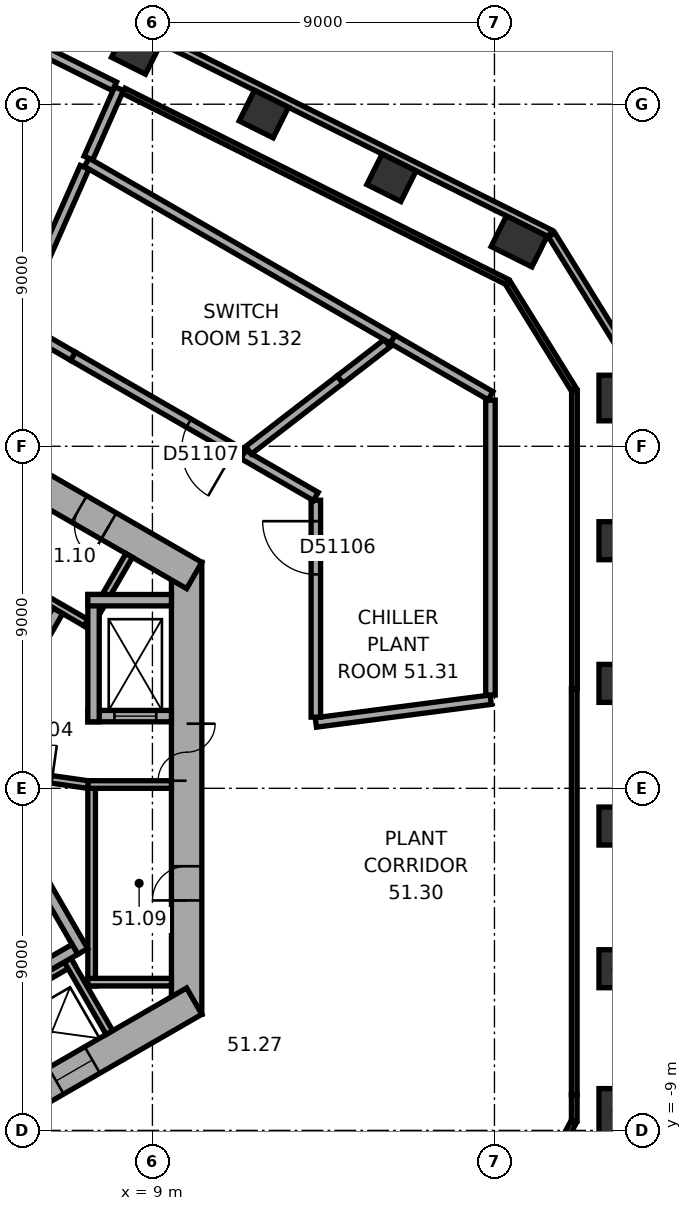
"""IFC4 building model, lengths in metres.
Left out: names, types, materials, properties, quantities, classifications, styles, units other than length and angle.
Written with IfcOpenShell. Run it as: python <this file> out.ifc"""

import sys

from ifc_helpers import new_model, si_unit, direction, frame, frame_2d, origin, origin_2d, place, context, subcontext, project, spatial, rectangle, extrude, element, fill, save


model = new_model("IFC4")
c1 = context("Model", 3, precision=1e-05, world=origin(), true_north=direction((0.0, 1.0)))
c2 = subcontext(c1, "Body", "Model", "MODEL_VIEW")
j1 = project(units=[si_unit("LENGTHUNIT", "METRE"), si_unit("PLANEANGLEUNIT", "RADIAN")], contexts=[c1])
p1 = place(None, origin())
s1 = spatial("IfcSite", under=j1, at=p1, CompositionType="ELEMENT")
p2 = place(p1, origin())
s2 = spatial("IfcBuilding", under=s1, at=p2, CompositionType="ELEMENT")
p3 = place(p2, frame((0.0, 0.0, 205.8)))
s3 = spatial("IfcBuildingStorey", under=s2, at=p3, CompositionType="ELEMENT", Elevation=205.8)
p4 = place(p3, frame((21.2, -8.501, 0.0), z_axis=(0.0, 0.0, 1.0), x_axis=(0.0, 1.0, 0.0)))
e1 = element("IfcColumn", 1, at=p4, inside=s3, PredefinedType="COLUMN", context=c2, shape_type="SweptSolid", body=[
    extrude(rectangle(XDim=1.2, YDim=0.9, at=origin_2d()), origin(), (0.0, 0.0, 1.0), 4.8),
])
for number, where, z_axis, x_axis in (
    (2, (21.2, -4.747, 0.0), (0.0, 0.0, 1.0), (0.0, 1.0, 0.0)),
    (3, (21.2, -0.993, 0.0), (0.0, 0.0, 1.0), (0.0, 1.0, 0.0)),
    (4, (21.2, 2.761, 0.0), (0.0, 0.0, 1.0), (0.0, 1.0, 0.0)),
    (5, (21.2, 6.515, 0.0), (0.0, 0.0, 1.0), (0.0, 1.0, 0.0)),
):
    element("IfcColumn", number, at=place(p3, frame(where, z_axis=z_axis, x_axis=x_axis)), inside=s3, PredefinedType="COLUMN", context=c2, shape_type="SweptSolid", body=[
        extrude(rectangle(XDim=1.0, YDim=0.9, at=origin_2d()), origin(), (0.0, 0.0, 1.0), 4.8),
    ])
for number, where, z_axis, x_axis in (
    (6, (21.2, 10.27, 0.0), (0.0, 0.0, 1.0), (0.0, 1.0, 0.0)),
    (7, (18.65, 14.39, 0.0), (0.0, 0.0, 1.0), (-0.895, 0.446, 0.0)),
):
    element("IfcColumn", number, at=place(p3, frame(where, z_axis=z_axis, x_axis=x_axis)), inside=s3, PredefinedType="COLUMN", context=c2, shape_type="SweptSolid", body=[
        extrude(rectangle(XDim=1.2, YDim=0.9, at=origin_2d()), origin(), (0.0, 0.0, 1.0), 4.8),
    ])
for number, where, z_axis, x_axis in (
    (8, (15.29, 16.065, 0.0), (0.0, 0.0, 1.0), (-0.895, 0.446, 0.0)),
    (9, (11.931, 17.74, 0.0), (0.0, 0.0, 1.0), (-0.895, 0.446, 0.0)),
    (10, (8.571, 19.416, 0.0), (0.0, 0.0, 1.0), (-0.895, 0.446, 0.0)),
):
    element("IfcColumn", number, at=place(p3, frame(where, z_axis=z_axis, x_axis=x_axis)), inside=s3, PredefinedType="COLUMN", context=c2, shape_type="SweptSolid", body=[
        extrude(rectangle(XDim=1.0, YDim=0.9, at=origin_2d()), origin(), (0.0, 0.0, 1.0), 4.8),
    ])
p5 = place(p3, frame((9.9, -5.947, 0.0), z_axis=(0.0, 0.0, 1.0), x_axis=(0.0, 1.0, 0.0)))
e11 = element("IfcWall", 11, at=p5, inside=s3, PredefinedType="SHEAR", context=c2, shape_type="SweptSolid", body=[
    extrude(rectangle(XDim=11.894, YDim=0.8, at=frame_2d((5.947, 0.0))), origin(), (0.0, 0.0, 1.0), 4.8),
])
p6 = place(p5, frame((6.147, 0.0, 0.0)))
e12 = element("IfcOpeningElement", 12, at=p6, cuts=e11, PredefinedType="OPENING", context=c2, shape_type="SweptSolid", body=[
    extrude(rectangle(XDim=1.5, YDim=2.1, at=frame_2d((0.75, 1.05))), frame((0.0, 0.41, 0.0), z_axis=(0.0, -1.0, 0.0), x_axis=(1.0, 0.0, 0.0)), (0.0, 0.0, 1.0), 0.82),
])
p7 = place(p5, frame((2.997, 0.0, 0.0)))
e13 = element("IfcOpeningElement", 13, at=p7, cuts=e11, PredefinedType="OPENING", context=c2, shape_type="SweptSolid", body=[
    extrude(rectangle(XDim=0.9, YDim=2.1, at=frame_2d((0.45, 1.05))), frame((0.0, 0.41, 0.0), z_axis=(0.0, -1.0, 0.0), x_axis=(1.0, 0.0, 0.0)), (0.0, 0.0, 1.0), 0.82),
])
p8 = place(p3, frame((10.1, 5.6, 0.0), z_axis=(0.0, 0.0, 1.0), x_axis=(-0.866023897231, 0.500002609418, 0.0)))
e14 = element("IfcWall", 14, at=p8, inside=s3, PredefinedType="SHEAR", context=c2, shape_type="SweptSolid", body=[
    extrude(rectangle(XDim=11.894, YDim=0.8, at=frame_2d((5.947, 0.0))), origin(), (0.0, 0.0, 1.0), 4.8),
])
p9 = place(p8, frame((2.597, 0.0, 0.0)))
e15 = element("IfcOpeningElement", 15, at=p9, cuts=e14, PredefinedType="OPENING", context=c2, shape_type="SweptSolid", body=[
    extrude(rectangle(XDim=0.9, YDim=2.1, at=frame_2d((0.45, 1.05))), frame((0.0, 0.41, 0.0), z_axis=(0.0, -1.0, 0.0), x_axis=(1.0, 0.0, 0.0)), (0.0, 0.0, 1.0), 0.82),
])
p10 = place(p8, frame((6.497, 0.0, 0.0)))
e16 = element("IfcOpeningElement", 16, at=p10, cuts=e14, PredefinedType="OPENING", context=c2, shape_type="SweptSolid", body=[
    extrude(rectangle(XDim=0.9, YDim=2.1, at=frame_2d((0.45, 1.05))), frame((0.0, 0.41, 0.0), z_axis=(0.0, -1.0, 0.0), x_axis=(1.0, 0.0, 0.0)), (0.0, 0.0, 1.0), 0.82),
])
p11 = place(p3, frame((-0.2, -11.547, 0.0), z_axis=(0.0, 0.0, 1.0), x_axis=(0.866023897231, 0.500002609418, 0.0)))
e17 = element("IfcWall", 17, at=p11, inside=s3, PredefinedType="SHEAR", context=c2, shape_type="SweptSolid", body=[
    extrude(rectangle(XDim=11.894, YDim=0.8, at=frame_2d((5.947, 0.0))), origin(), (0.0, 0.0, 1.0), 4.8),
])
p12 = place(p11, frame((2.497, 0.0, 0.0)))
e18 = element("IfcOpeningElement", 18, at=p12, cuts=e17, PredefinedType="OPENING", context=c2, shape_type="SweptSolid", body=[
    extrude(rectangle(XDim=1.1, YDim=2.1, at=frame_2d((0.55, 1.05))), frame((0.0, 0.41, 0.0), z_axis=(0.0, -1.0, 0.0), x_axis=(1.0, 0.0, 0.0)), (0.0, 0.0, 1.0), 0.82),
])
p13 = place(p11, frame((5.097, 0.0, 0.0)))
e19 = element("IfcOpeningElement", 19, at=p13, cuts=e17, PredefinedType="OPENING", context=c2, shape_type="SweptSolid", body=[
    extrude(rectangle(XDim=1.1, YDim=2.1, at=frame_2d((0.55, 1.05))), frame((0.0, 0.41, 0.0), z_axis=(0.0, -1.0, 0.0), x_axis=(1.0, 0.0, 0.0)), (0.0, 0.0, 1.0), 0.82),
])
p14 = place(p11, frame((7.697, 0.0, 0.0)))
e20 = element("IfcOpeningElement", 20, at=p14, cuts=e17, PredefinedType="OPENING", context=c2, shape_type="SweptSolid", body=[
    extrude(rectangle(XDim=1.1, YDim=2.1, at=frame_2d((0.55, 1.05))), frame((0.0, 0.41, 0.0), z_axis=(0.0, -1.0, 0.0), x_axis=(1.0, 0.0, 0.0)), (0.0, 0.0, 1.0), 0.82),
])
p15 = place(p3, frame((21.735, 10.958, 0.0), z_axis=(0.0, 0.0, 1.0), x_axis=(-0.526213807775, 0.850352296702, 0.0)))
e21 = element("IfcWall", 21, at=p15, inside=s3, PredefinedType="STANDARD", context=c2, shape_type="SweptSolid", body=[
    extrude(rectangle(XDim=4.238, YDim=0.2, at=frame_2d((2.119, 0.0))), origin(), (0.0, 0.0, 1.0), 4.8),
])
p16 = place(p3, frame((19.464, 14.599, 0.0), z_axis=(0.0, 0.0, 1.0), x_axis=(-0.894935755043, 0.446195018289, 0.0)))
e22 = element("IfcWall", 22, at=p16, inside=s3, PredefinedType="STANDARD", context=c2, shape_type="SweptSolid", body=[
    extrude(rectangle(XDim=20.044, YDim=0.2, at=frame_2d((10.022, 0.0))), origin(), (0.0, 0.0, 1.0), 4.8),
])
p17 = place(p3, frame((7.4, -5.2, 0.0), z_axis=(0.0, 0.0, 1.0), x_axis=(0.0, 1.0, 0.0)))
e23 = element("IfcWall", 23, at=p17, inside=s3, PredefinedType="PARTITIONING", context=c2, shape_type="SweptSolid", body=[
    extrude(rectangle(XDim=5.4, YDim=0.2, at=frame_2d((2.7, 0.0))), origin(), (0.0, 0.0, 1.0), 4.52),
])
for number, where, z_axis, x_axis in (
    (24, (7.3, -5.1, 0.0), (0.0, 0.0, 1.0), (1.0, 0.0, 0.0)),
    (25, (7.3, 0.1, 0.0), (0.0, 0.0, 1.0), (1.0, 0.0, 0.0)),
):
    element("IfcWall", number, at=place(p3, frame(where, z_axis=z_axis, x_axis=x_axis)), inside=s3, PredefinedType="PARTITIONING", context=c2, shape_type="SweptSolid", body=[
        extrude(rectangle(XDim=2.2, YDim=0.2, at=frame_2d((1.1, 0.0))), origin(), (0.0, 0.0, 1.0), 4.52),
    ])
p18 = place(p3, frame((7.424, 4.259, 0.0), z_axis=(0.0, 0.0, 1.0), x_axis=(-0.866026010844, 0.49999894854, 0.0)))
e26 = element("IfcWall", 26, at=p18, inside=s3, PredefinedType="PARTITIONING", context=c2, shape_type="SweptSolid", body=[
    extrude(rectangle(XDim=8.0, YDim=0.2, at=frame_2d((4.0, 0.0))), origin(), (0.0, 0.0, 1.0), 4.52),
])
p19 = place(p3, frame((7.287, 4.222, 0.0), z_axis=(0.0, 0.0, 1.0), x_axis=(0.499946605688, 0.86605622881, 0.0)))
e27 = element("IfcWall", 27, at=p19, inside=s3, PredefinedType="PARTITIONING", context=c2, shape_type="SweptSolid", body=[
    extrude(rectangle(XDim=2.2, YDim=0.2, at=frame_2d((1.1, 0.0))), origin(), (0.0, 0.0, 1.0), 4.52),
])
p20 = place(p3, frame((-0.024, -8.559, 0.0), z_axis=(0.0, 0.0, 1.0), x_axis=(0.866026010844, 0.49999894854, 0.0)))
e28 = element("IfcWall", 28, at=p20, inside=s3, PredefinedType="PARTITIONING", context=c2, shape_type="SweptSolid", body=[
    extrude(rectangle(XDim=8.0, YDim=0.2, at=frame_2d((4.0, 0.0))), origin(), (0.0, 0.0, 1.0), 4.52),
])
p21 = place(p3, frame((6.768, -4.522, 0.0), z_axis=(0.0, 0.0, 1.0), x_axis=(0.50002983664, -0.866008176907, 0.0)))
e29 = element("IfcWall", 29, at=p21, inside=s3, PredefinedType="PARTITIONING", context=c2, shape_type="SweptSolid", body=[
    extrude(rectangle(XDim=2.2, YDim=0.2, at=frame_2d((1.1, 0.0))), origin(), (0.0, 0.0, 1.0), 4.52),
])
p22 = place(p3, frame((4.158, 0.602, 0.0), z_axis=(0.0, 0.0, 1.0), x_axis=(0.499977259774, 0.866038532462, 0.0)))
e30 = element("IfcWall", 30, at=p22, inside=s3, PredefinedType="SHEAR", context=c2, shape_type="SweptSolid", body=[
    extrude(rectangle(XDim=4.7, YDim=0.3, at=frame_2d((2.35, 0.0))), origin(), (0.0, 0.0, 1.0), 4.52),
])
p23 = place(p22, frame((0.8, 0.0, 0.0)))
e31 = element("IfcOpeningElement", 31, at=p23, cuts=e30, PredefinedType="OPENING", context=c2, shape_type="SweptSolid", body=[
    extrude(rectangle(XDim=1.2, YDim=2.1, at=frame_2d((0.6, 1.05))), frame((0.0, 0.16, 0.0), z_axis=(0.0, -1.0, 0.0), x_axis=(1.0, 0.0, 0.0)), (0.0, 0.0, 1.0), 0.32),
])
p24 = place(p3, frame((6.303, 4.617, 0.0), z_axis=(0.0, 0.0, 1.0), x_axis=(-0.866027801685, 0.499995846692, 0.0)))
e32 = element("IfcWall", 32, at=p24, inside=s3, PredefinedType="SHEAR", context=c2, shape_type="SweptSolid", body=[
    extrude(rectangle(XDim=7.06, YDim=0.3, at=frame_2d((3.53, 0.0))), origin(), (0.0, 0.0, 1.0), 4.52),
])
p25 = place(p3, frame((4.816, -0.222, 0.0), z_axis=(0.0, 0.0, 1.0), x_axis=(0.499977259774, -0.866038532462, 0.0)))
e33 = element("IfcWall", 33, at=p25, inside=s3, PredefinedType="SHEAR", context=c2, shape_type="SweptSolid", body=[
    extrude(rectangle(XDim=4.7, YDim=0.3, at=frame_2d((2.35, 0.0))), origin(), (0.0, 0.0, 1.0), 4.52),
])
p26 = place(p3, frame((0.847, -7.767, 0.0), z_axis=(0.0, 0.0, 1.0), x_axis=(0.866027801685, 0.499995846692, 0.0)))
e34 = element("IfcWall", 34, at=p26, inside=s3, PredefinedType="SHEAR", context=c2, shape_type="SweptSolid", body=[
    extrude(rectangle(XDim=7.06, YDim=0.3, at=frame_2d((3.53, 0.0))), origin(), (0.0, 0.0, 1.0), 4.52),
])
p27 = place(p3, frame((7.3, 1.9, 0.0), z_axis=(0.0, 0.0, 1.0), x_axis=(1.0, 0.0, 0.0)))
e35 = element("IfcWall", 35, at=p27, inside=s3, PredefinedType="SHEAR", context=c2, shape_type="SweptSolid", body=[
    extrude(rectangle(XDim=2.2, YDim=0.3, at=frame_2d((1.1, 0.0))), origin(), (0.0, 0.0, 1.0), 4.52),
])
p28 = place(p27, frame((0.7, 0.0, 0.0)))
e36 = element("IfcOpeningElement", 36, at=p28, cuts=e35, PredefinedType="OPENING", context=c2, shape_type="SweptSolid", body=[
    extrude(rectangle(XDim=1.1, YDim=2.1, at=frame_2d((0.55, 1.05))), frame((0.0, 0.16, 0.0), z_axis=(0.0, -1.0, 0.0), x_axis=(1.0, 0.0, 0.0)), (0.0, 0.0, 1.0), 0.32),
])
p29 = place(p3, frame((7.45, 1.75, 0.0), z_axis=(0.0, 0.0, 1.0), x_axis=(0.0, 1.0, 0.0)))
e37 = element("IfcWall", 37, at=p29, inside=s3, PredefinedType="SHEAR", context=c2, shape_type="SweptSolid", body=[
    extrude(rectangle(XDim=3.35, YDim=0.3, at=frame_2d((1.675, 0.0))), origin(), (0.0, 0.0, 1.0), 4.52),
])
p30 = place(p3, frame((7.3, 4.95, 0.0), z_axis=(0.0, 0.0, 1.0), x_axis=(1.0, 0.0, 0.0)))
e38 = element("IfcWall", 38, at=p30, inside=s3, PredefinedType="SHEAR", context=c2, shape_type="SweptSolid", body=[
    extrude(rectangle(XDim=2.2, YDim=0.3, at=frame_2d((1.1, 0.0))), origin(), (0.0, 0.0, 1.0), 4.52),
])
p31 = place(p3, frame((4.327, 0.521, 0.0), z_axis=(0.0, 0.0, 1.0), x_axis=(0.990124376366, -0.14019172346, 0.0)))
e39 = element("IfcWall", 39, at=p31, inside=s3, PredefinedType="PARTITIONING", context=c2, shape_type="SweptSolid", body=[
    extrude(rectangle(XDim=3.002, YDim=0.2, at=frame_2d((1.501, 0.0))), origin(), (0.0, 0.0, 1.0), 4.52),
])
p32 = place(p31, frame((1.15, 0.0, 0.0)))
e40 = element("IfcOpeningElement", 40, at=p32, cuts=e39, PredefinedType="OPENING", context=c2, shape_type="SweptSolid", body=[
    extrude(rectangle(XDim=0.9, YDim=2.1, at=frame_2d((0.45, 1.05))), frame((0.0, 0.11, 0.0), z_axis=(0.0, -1.0, 0.0), x_axis=(1.0, 0.0, 0.0)), (0.0, 0.0, 1.0), 0.22),
])
p33 = place(p3, frame((20.081, -8.784, 0.0), z_axis=(0.0, 0.0, 1.0), x_axis=(-0.473349998863, -0.880874439734, 0.0)))
e41 = element("IfcWall", 41, at=p33, inside=s3, PredefinedType="PARTITIONING", context=c2, shape_type="SweptSolid", body=[
    extrude(rectangle(XDim=3.535, YDim=0.15, at=frame_2d((1.767, 0.0))), origin(), (0.0, 0.0, 1.0), 4.52),
])
p34 = place(p3, frame((20.1, -8.06, 0.0), z_axis=(0.0, 0.0, 1.0), x_axis=(0.0, -1.0, 0.0)))
e42 = element("IfcWall", 42, at=p34, inside=s3, PredefinedType="PARTITIONING", context=c2, shape_type="SweptSolid", body=[
    extrude(rectangle(XDim=0.688, YDim=0.15, at=frame_2d((0.344, 0.0))), origin(), (0.0, 0.0, 1.0), 4.52),
])
p35 = place(p3, frame((13.3, 1.732, 0.0), z_axis=(0.0, 0.0, 1.0), x_axis=(0.991624166516, 0.129156929283, 0.0)))
e43 = element("IfcWall", 43, at=p35, inside=s3, PredefinedType="SOLIDWALL", context=c2, shape_type="SweptSolid", body=[
    extrude(rectangle(XDim=4.639, YDim=0.25, at=frame_2d((2.319, 0.0))), origin(), (0.0, 0.0, 1.0), 3.6),
])
p36 = place(p3, frame((17.895, 2.454, 0.0), z_axis=(0.0, 0.0, 1.0), x_axis=(0.0, 1.0, 0.0)))
e44 = element("IfcWall", 44, at=p36, inside=s3, PredefinedType="SOLIDWALL", context=c2, shape_type="SweptSolid", body=[
    extrude(rectangle(XDim=7.76, YDim=0.25, at=frame_2d((3.88, 0.0))), origin(), (0.0, 0.0, 1.0), 4.52),
])
p37 = place(p3, frame((20.1, 2.615, 0.0), z_axis=(0.0, 0.0, 1.0), x_axis=(0.0, -1.0, 0.0)))
e45 = element("IfcWall", 45, at=p37, inside=s3, PredefinedType="PARTITIONING", context=c2, shape_type="SweptSolid", body=[
    extrude(rectangle(XDim=10.676, YDim=0.15, at=frame_2d((5.338, 0.0))), origin(), (0.0, 0.0, 1.0), 4.02),
])
p38 = place(p3, frame((13.3, 7.579, 0.0), z_axis=(0.0, 0.0, 1.0), x_axis=(0.0, -1.0, 0.0)))
e46 = element("IfcWall", 46, at=p38, inside=s3, PredefinedType="SOLIDWALL", context=c2, shape_type="SweptSolid", body=[
    extrude(rectangle(XDim=5.707, YDim=0.25, at=frame_2d((2.853, 0.0))), origin(), (0.0, 0.0, 1.0), 4.52),
])
p39 = place(p38, frame((0.55, 0.0, 0.0)))
e47 = element("IfcOpeningElement", 47, at=p39, cuts=e46, PredefinedType="OPENING", context=c2, shape_type="SweptSolid", body=[
    extrude(rectangle(XDim=1.4, YDim=2.1, at=frame_2d((0.7, 1.05))), frame((0.0, 0.135, 0.0), z_axis=(0.0, -1.0, 0.0), x_axis=(1.0, 0.0, 0.0)), (0.0, 0.0, 1.0), 0.27),
])
p40 = place(p3, frame((13.3, 7.679, 0.0), z_axis=(0.0, 0.0, 1.0), x_axis=(-0.866060565847, 0.499939092575, 0.0)))
e48 = element("IfcWall", 48, at=p40, inside=s3, PredefinedType="SOLIDWALL", context=c2, shape_type="SweptSolid", body=[
    extrude(rectangle(XDim=2.211, YDim=0.25, at=frame_2d((1.105, 0.0))), origin(), (0.0, 0.0, 1.0), 4.52),
])
p41 = place(p3, frame((11.385, 8.784, 0.0), z_axis=(0.0, 0.0, 1.0), x_axis=(-0.866019619451, 0.500010018626, 0.0)))
e49 = element("IfcWall", 49, at=p41, inside=s3, PredefinedType="SOLIDWALL", context=c2, shape_type="SweptSolid", body=[
    extrude(rectangle(XDim=5.169, YDim=0.25, at=frame_2d((2.584, 0.0))), origin(), (0.0, 0.0, 1.0), 4.52),
])
p42 = place(p41, frame((0.25, 0.0, 0.0)))
e50 = element("IfcOpeningElement", 50, at=p42, cuts=e49, PredefinedType="OPENING", context=c2, shape_type="SweptSolid", body=[
    extrude(rectangle(XDim=1.4, YDim=2.1, at=frame_2d((0.7, 1.05))), frame((0.0, 0.135, 0.0), z_axis=(0.0, -1.0, 0.0), x_axis=(1.0, 0.0, 0.0)), (0.0, 0.0, 1.0), 0.27),
])
p43 = place(p3, frame((11.528, 8.895, 0.0), z_axis=(0.0, 0.0, 1.0), x_axis=(0.791702519006, 0.610906802549, 0.0)))
e51 = element("IfcWall", 51, at=p43, inside=s3, PredefinedType="SOLIDWALL", context=c2, shape_type="SweptSolid", body=[
    extrude(rectangle(XDim=3.046, YDim=0.25, at=frame_2d((1.523, 0.0))), origin(), (0.0, 0.0, 1.0), 3.6),
])
p44 = place(p3, frame((17.897, 10.33, 0.0), z_axis=(0.0, 0.0, 1.0), x_axis=(-0.865977955363, 0.500082174072, 0.0)))
e52 = element("IfcWall", 52, at=p44, inside=s3, PredefinedType="SOLIDWALL", context=c2, shape_type="SweptSolid", body=[
    extrude(rectangle(XDim=2.977, YDim=0.25, at=frame_2d((1.488, 0.0))), origin(), (0.0, 0.0, 1.0), 4.52),
])
p45 = place(p3, frame((20.105, 10.463, 0.0), z_axis=(0.0, 0.0, 1.0), x_axis=(0.0, -1.0, 0.0)))
e53 = element("IfcWall", 53, at=p45, inside=s3, PredefinedType="PARTITIONING", context=c2, shape_type="SweptSolid", body=[
    extrude(rectangle(XDim=7.838, YDim=0.15, at=frame_2d((3.919, 0.0))), origin(), (0.0, 0.0, 1.0), 4.02),
])
p46 = place(p3, frame((6.909, 11.369, 0.0), z_axis=(0.0, 0.0, 1.0), x_axis=(-0.86600557522, 0.500034342508, 0.0)))
e54 = element("IfcWall", 54, at=p46, inside=s3, PredefinedType="SOLIDWALL", context=c2, shape_type="SweptSolid", body=[
    extrude(rectangle(XDim=1.739, YDim=0.25, at=frame_2d((0.87, 0.0))), origin(), (0.0, 0.0, 1.0), 4.52),
])
p47 = place(p3, frame((15.176, 11.71, 0.0), z_axis=(0.0, 0.0, 1.0), x_axis=(-0.791611549425, -0.611024676111, 0.0)))
e55 = element("IfcWall", 55, at=p47, inside=s3, PredefinedType="SOLIDWALL", context=c2, shape_type="SweptSolid", body=[
    extrude(rectangle(XDim=1.562, YDim=0.25, at=frame_2d((0.781, 0.0))), origin(), (0.0, 0.0, 1.0), 3.6),
])
p48 = place(p3, frame((5.459, 12.366, 0.0), z_axis=(0.0, 0.0, 1.0), x_axis=(0.403858781997, 0.914821340046, 0.0)))
e56 = element("IfcWall", 56, at=p48, inside=s3, PredefinedType="SOLIDWALL", context=c2, shape_type="SweptSolid", body=[
    extrude(rectangle(XDim=4.345, YDim=0.25, at=frame_2d((2.172, 0.0))), origin(), (0.0, 0.0, 1.0), 3.6),
])
p49 = place(p3, frame((18.361, 13.285, 0.0), z_axis=(0.0, 0.0, 1.0), x_axis=(0.526256972847, -0.850325583838, 0.0)))
e57 = element("IfcWall", 57, at=p49, inside=s3, PredefinedType="PARTITIONING", context=c2, shape_type="SweptSolid", body=[
    extrude(rectangle(XDim=3.271, YDim=0.15, at=frame_2d((1.635, 0.0))), origin(), (0.0, 0.0, 1.0), 4.52),
])
p50 = place(p3, frame((7.271, 16.471, 0.0), z_axis=(0.0, 0.0, 1.0), x_axis=(0.866053086045, -0.499952049853, 0.0)))
e58 = element("IfcWall", 58, at=p50, inside=s3, PredefinedType="SOLIDWALL", context=c2, shape_type="SweptSolid", body=[
    extrude(rectangle(XDim=9.297, YDim=0.25, at=frame_2d((4.648, 0.0))), origin(), (0.0, 0.0, 1.0), 4.52),
])
p51 = place(p3, frame((7.315, 16.583, 0.0), z_axis=(0.0, 0.0, 1.0), x_axis=(0.403868911369, 0.914816868247, 0.0)))
e59 = element("IfcWall", 59, at=p51, inside=s3, PredefinedType="SOLIDWALL", context=c2, shape_type="SweptSolid", body=[
    extrude(rectangle(XDim=1.997, YDim=0.25, at=frame_2d((0.999, 0.0))), origin(), (0.0, 0.0, 1.0), 3.6),
])
p52 = place(p3, frame((8.245, 18.354, 0.0), z_axis=(0.0, 0.0, 1.0), x_axis=(0.89492476712, -0.446217056145, 0.0)))
e60 = element("IfcWall", 60, at=p52, inside=s3, PredefinedType="PARTITIONING", context=c2, shape_type="SweptSolid", body=[
    extrude(rectangle(XDim=11.273, YDim=0.15, at=frame_2d((5.636, 0.0))), origin(), (0.0, 0.0, 1.0), 4.02),
])
p53 = place(p3, frame((1.139, 21.892, 0.0), z_axis=(0.0, 0.0, 1.0), x_axis=(0.894929805906, -0.446206950306, 0.0)))
e61 = element("IfcWall", 61, at=p53, inside=s3, PredefinedType="SOLIDWALL", context=c2, shape_type="SweptSolid", body=[
    extrude(rectangle(XDim=7.666, YDim=0.25, at=frame_2d((3.833, 0.0))), origin(), (0.0, 0.0, 1.0), 4.02),
])
p54 = place(p6, origin())
e62 = element("IfcDoor", 62, at=p54, inside=s3, OperationType="DOUBLE_DOOR_SINGLE_SWING", PredefinedType="DOOR", context=c2, shape_type="SweptSolid", body=[
    extrude(rectangle(XDim=1.5, YDim=2.1, at=frame_2d((0.75, 1.05))), frame((0.0, 0.025, 0.0), z_axis=(0.0, -1.0, 0.0), x_axis=(1.0, 0.0, 0.0)), (0.0, 0.0, 1.0), 0.05),
])
fill(e12, e62)
p55 = place(p7, origin())
e63 = element("IfcDoor", 63, at=p55, inside=s3, OperationType="SINGLE_SWING_LEFT", PredefinedType="DOOR", context=c2, shape_type="SweptSolid", body=[
    extrude(rectangle(XDim=0.9, YDim=2.1, at=frame_2d((0.45, 1.05))), frame((0.0, 0.025, 0.0), z_axis=(0.0, -1.0, 0.0), x_axis=(1.0, 0.0, 0.0)), (0.0, 0.0, 1.0), 0.05),
])
fill(e13, e63)
p56 = place(p9, origin())
e64 = element("IfcDoor", 64, at=p56, inside=s3, OperationType="SINGLE_SWING_LEFT", PredefinedType="DOOR", context=c2, shape_type="SweptSolid", body=[
    extrude(rectangle(XDim=0.9, YDim=2.1, at=frame_2d((0.45, 1.05))), frame((0.0, 0.025, 0.0), z_axis=(0.0, -1.0, 0.0), x_axis=(1.0, 0.0, 0.0)), (0.0, 0.0, 1.0), 0.05),
])
fill(e15, e64)
p57 = place(p28, origin())
e65 = element("IfcDoor", 65, at=p57, inside=s3, OperationType="DOUBLE_DOOR_SLIDING", PredefinedType="DOOR", context=c2, shape_type="SweptSolid", body=[
    extrude(rectangle(XDim=1.1, YDim=2.1, at=frame_2d((0.55, 1.05))), frame((0.0, 0.025, 0.0), z_axis=(0.0, -1.0, 0.0), x_axis=(1.0, 0.0, 0.0)), (0.0, 0.0, 1.0), 0.05),
])
fill(e36, e65)
p58 = place(p14, origin())
e66 = element("IfcDoor", 66, at=p58, inside=s3, OperationType="DOUBLE_DOOR_SLIDING", PredefinedType="DOOR", context=c2, shape_type="SweptSolid", body=[
    extrude(rectangle(XDim=1.1, YDim=2.1, at=frame_2d((0.55, 1.05))), frame((0.0, 0.025, 0.0), z_axis=(0.0, -1.0, 0.0), x_axis=(1.0, 0.0, 0.0)), (0.0, 0.0, 1.0), 0.05),
])
fill(e20, e66)
p59 = place(p39, origin())
e67 = element("IfcDoor", 67, at=p59, inside=s3, OperationType="SINGLE_SWING_LEFT", PredefinedType="DOOR", context=c2, shape_type="SweptSolid", body=[
    extrude(rectangle(XDim=1.4, YDim=2.1, at=frame_2d((0.7, 1.05))), frame((0.0, 0.025, 0.0), z_axis=(0.0, -1.0, 0.0), x_axis=(1.0, 0.0, 0.0)), (0.0, 0.0, 1.0), 0.05),
])
fill(e47, e67)
p60 = place(p42, origin())
e68 = element("IfcDoor", 68, at=p60, inside=s3, OperationType="SINGLE_SWING_LEFT", PredefinedType="DOOR", context=c2, shape_type="SweptSolid", body=[
    extrude(rectangle(XDim=1.4, YDim=2.1, at=frame_2d((0.7, 1.05))), frame((0.0, 0.025, 0.0), z_axis=(0.0, -1.0, 0.0), x_axis=(1.0, 0.0, 0.0)), (0.0, 0.0, 1.0), 0.05),
])
fill(e50, e68)
save(model, sys.argv[1])
